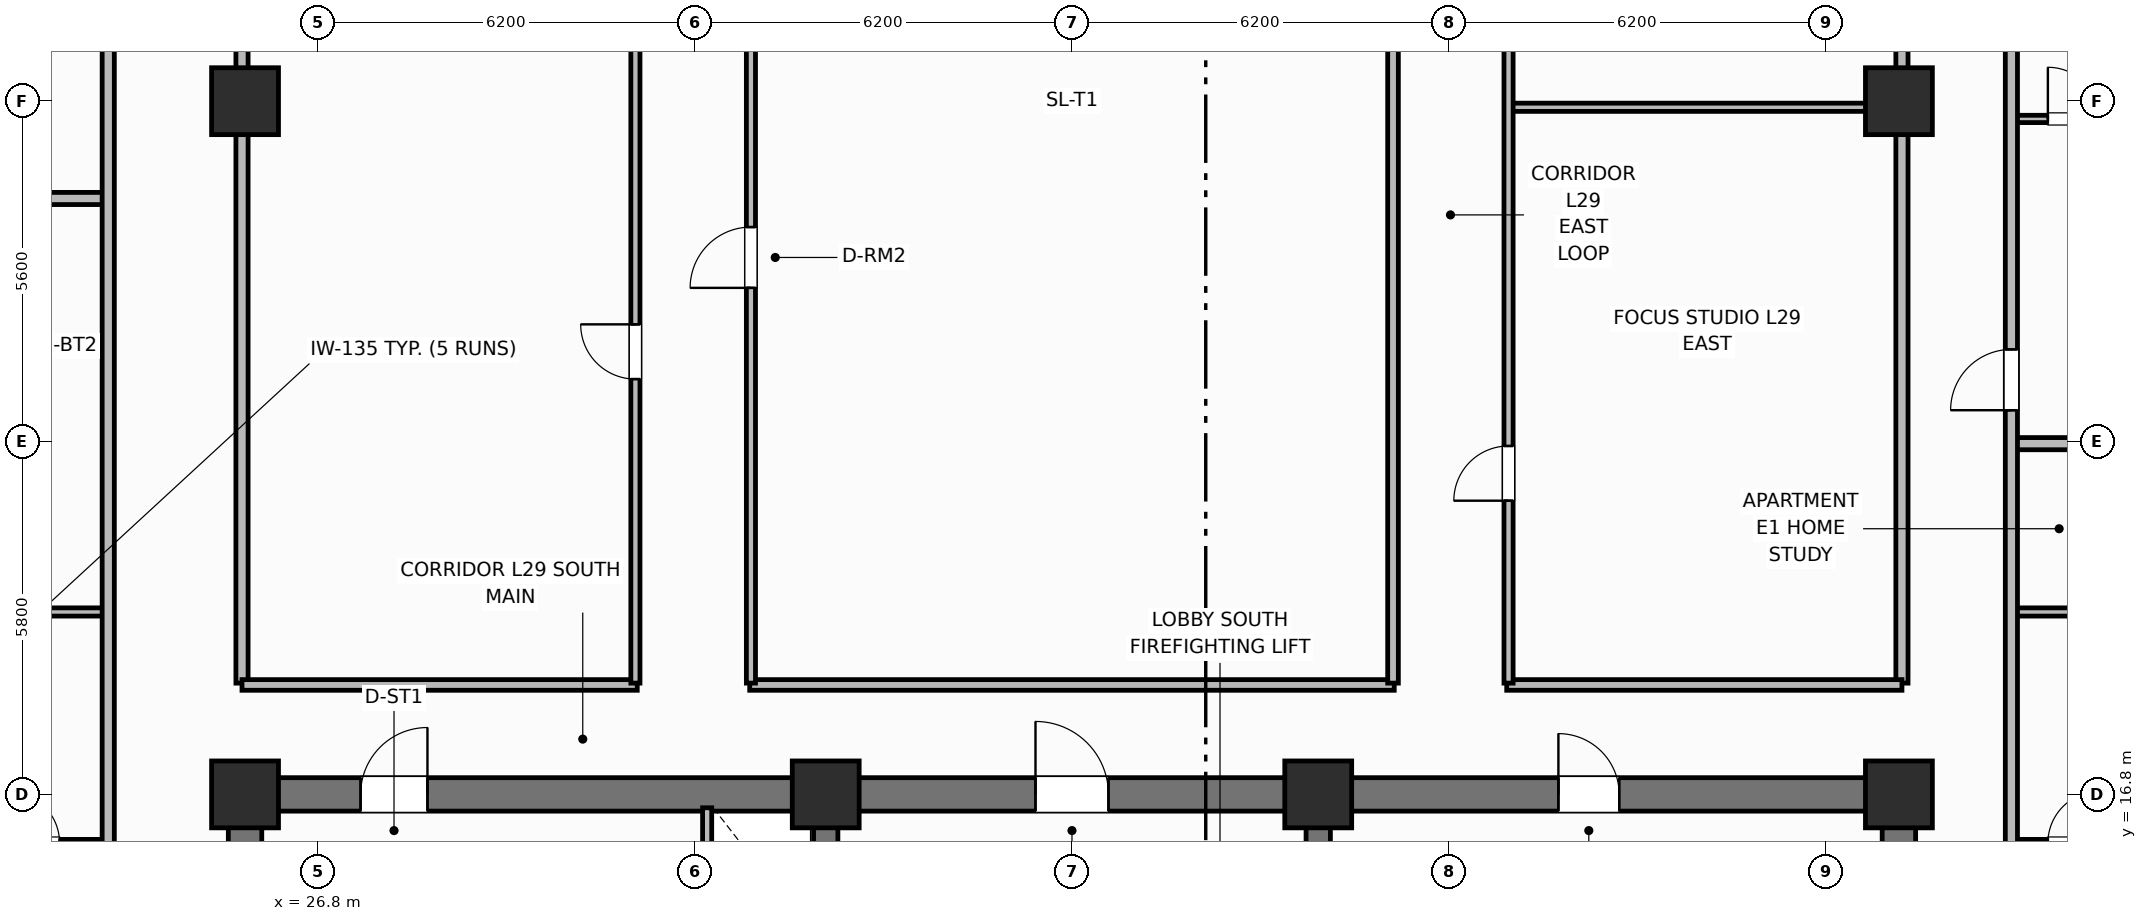
"""IFC4 building model, lengths in metres.
Left out: names, types, materials, properties, quantities, classifications, styles, units other than length and angle.
Written with IfcOpenShell. Run it as: python <this file> out.ifc"""

import sys

from ifc_helpers import new_model, si_unit, direction, frame, frame_2d, origin, origin_2d, place, context, subcontext, project, spatial, rectangle, extrude, element, fill, save


model = new_model("IFC4")
c1 = context("Model", 3, precision=1e-05, world=origin(), true_north=direction((0.0, 1.0)))
c2 = subcontext(c1, "Body", "Model", "MODEL_VIEW")
j1 = project(units=[si_unit("LENGTHUNIT", "METRE"), si_unit("PLANEANGLEUNIT", "RADIAN")], contexts=[c1])
p1 = place(None, origin())
s1 = spatial("IfcSite", under=j1, at=p1, CompositionType="ELEMENT")
p2 = place(p1, origin())
s2 = spatial("IfcBuilding", under=s1, at=p2, CompositionType="ELEMENT")
p3 = place(p2, frame((0.0, 0.0, 117.9)))
s3 = spatial("IfcBuildingStorey", under=s2, at=p3, CompositionType="ELEMENT", Elevation=117.9)
for number, where, z_axis, x_axis in (
    (1, (25.6, 10.875, 0.0), (0.0, 0.0, 1.0), (0.0, 1.0, 0.0)),
    (2, (52.8, 10.875, 0.0), (0.0, 0.0, 1.0), (0.0, 1.0, 0.0)),
):
    element("IfcWall", number, at=place(p3, frame(where, z_axis=z_axis, x_axis=x_axis)), inside=s3, PredefinedType="SHEAR", context=c2, shape_type="SweptSolid", body=[
        extrude(rectangle(XDim=5.65, YDim=0.55, at=frame_2d((2.825, 0.0))), origin(), (0.0, 0.0, 1.0), 3.7),
    ])
p4 = place(p3, frame((25.6, 16.8, 0.0), z_axis=(0.0, 0.0, 1.0), x_axis=(1.0, 0.0, 0.0)))
e3 = element("IfcWall", 3, at=p4, inside=s3, PredefinedType="SHEAR", context=c2, shape_type="SweptSolid", body=[
    extrude(rectangle(XDim=27.2, YDim=0.55, at=frame_2d((13.6, 0.0))), origin(), (0.0, 0.0, 1.0), 3.7),
])
p5 = place(p4, frame((1.9, 0.0, 0.0)))
e4 = element("IfcOpeningElement", 4, at=p5, cuts=e3, PredefinedType="OPENING", context=c2, shape_type="SweptSolid", body=[
    extrude(rectangle(XDim=1.1, YDim=2.15, at=frame_2d((0.55, 1.075))), frame((0.0, 0.285, 0.0), z_axis=(0.0, -1.0, 0.0), x_axis=(1.0, 0.0, 0.0)), (0.0, 0.0, 1.0), 0.57),
])
p6 = place(p4, frame((13.0, 0.0, 0.0)))
e5 = element("IfcOpeningElement", 5, at=p6, cuts=e3, PredefinedType="OPENING", context=c2, shape_type="SweptSolid", body=[
    extrude(rectangle(XDim=1.2, YDim=2.15, at=frame_2d((0.6, 1.075))), frame((0.0, 0.285, 0.0), z_axis=(0.0, -1.0, 0.0), x_axis=(1.0, 0.0, 0.0)), (0.0, 0.0, 1.0), 0.57),
])
p7 = place(p4, frame((21.6, 0.0, 0.0)))
e6 = element("IfcOpeningElement", 6, at=p7, cuts=e3, PredefinedType="OPENING", context=c2, shape_type="SweptSolid", body=[
    extrude(rectangle(XDim=1.0, YDim=2.15, at=frame_2d((0.5, 1.075))), frame((0.0, 0.285, 0.0), z_axis=(0.0, -1.0, 0.0), x_axis=(1.0, 0.0, 0.0)), (0.0, 0.0, 1.0), 0.57),
])
for number, where, z_axis, x_axis in (
    (7, (35.15, 10.875, 0.0), (0.0, 0.0, 1.0), (0.0, 1.0, 0.0)),
    (8, (43.25, 10.875, 0.0), (0.0, 0.0, 1.0), (0.0, 1.0, 0.0)),
):
    element("IfcWall", number, at=place(p3, frame(where, z_axis=z_axis, x_axis=x_axis)), inside=s3, PredefinedType="SHEAR", context=c2, shape_type="SweptSolid", body=[
        extrude(rectangle(XDim=5.65, YDim=0.4, at=frame_2d((2.825, 0.0))), origin(), (0.0, 0.0, 1.0), 3.7),
    ])
for number, where, z_axis, x_axis in (
    (9, (25.6, 16.8, 0.0), (0.0, 0.0, 1.0), (1.0, 0.0, 0.0)),
    (10, (35.15, 16.8, 0.0), (0.0, 0.0, 1.0), (1.0, 0.0, 0.0)),
    (11, (43.25, 16.8, 0.0), (0.0, 0.0, 1.0), (1.0, 0.0, 0.0)),
    (12, (52.8, 16.8, 0.0), (0.0, 0.0, 1.0), (1.0, 0.0, 0.0)),
    (13, (25.6, 28.2, 0.0), (0.0, 0.0, 1.0), (1.0, 0.0, 0.0)),
    (14, (52.8, 28.2, 0.0), (0.0, 0.0, 1.0), (1.0, 0.0, 0.0)),
):
    element("IfcColumn", number, at=place(p3, frame(where, z_axis=z_axis, x_axis=x_axis)), inside=s3, PredefinedType="COLUMN", context=c2, shape_type="SweptSolid", body=[
        extrude(rectangle(XDim=1.1, YDim=1.1, at=origin_2d()), origin(), (0.0, 0.0, 1.0), 3.7),
    ])
p8 = place(p3, frame((33.2, 14.5, 0.0), z_axis=(0.0, 0.0, 1.0), x_axis=(0.0, 1.0, 0.0)))
e15 = element("IfcWall", 15, at=p8, inside=s3, PredefinedType="PARTITIONING", context=c2, shape_type="SweptSolid", body=[
    extrude(rectangle(XDim=2.08, YDim=0.15, at=frame_2d((1.04, 0.0))), origin(), (0.0, 0.0, 1.0), 2.53),
])
p9 = place(p8, frame((0.55, 0.0, 0.0)))
e16 = element("IfcOpeningElement", 16, at=p9, cuts=e15, PredefinedType="OPENING", context=c2, shape_type="SweptSolid", body=[
    extrude(rectangle(XDim=0.85, YDim=2.05, at=frame_2d((0.425, 1.025))), frame((0.0, 0.085, 0.0), z_axis=(0.0, -1.0, 0.0), x_axis=(1.0, 0.0, 0.0)), (0.0, 0.0, 1.0), 0.17),
])
for number, where, z_axis, x_axis in (
    (17, (25.55, 18.63, 0.0), (0.0, 0.0, 1.0), (0.0, 1.0, 0.0)),
    (18, (52.85, 18.63, 0.0), (0.0, 0.0, 1.0), (0.0, 1.0, 0.0)),
):
    element("IfcWall", number, at=place(p3, frame(where, z_axis=z_axis, x_axis=x_axis)), inside=s3, PredefinedType="PARTITIONING", context=c2, shape_type="SweptSolid", body=[
        extrude(rectangle(XDim=19.14, YDim=0.2, at=frame_2d((9.57, 0.0))), origin(), (0.0, 0.0, 1.0), 2.53),
    ])
p10 = place(p3, frame((25.55, 18.6, 0.0), z_axis=(0.0, 0.0, 1.0), x_axis=(1.0, 0.0, 0.0)))
e19 = element("IfcWall", 19, at=p10, inside=s3, PredefinedType="PARTITIONING", context=c2, shape_type="SweptSolid", body=[
    extrude(rectangle(XDim=6.5, YDim=0.175, at=frame_2d((3.25, 0.0))), origin(), (0.0, 0.0, 1.0), 2.53),
])
p11 = place(p3, frame((33.9, 18.6, 0.0), z_axis=(0.0, 0.0, 1.0), x_axis=(1.0, 0.0, 0.0)))
e20 = element("IfcWall", 20, at=p11, inside=s3, PredefinedType="PARTITIONING", context=c2, shape_type="SweptSolid", body=[
    extrude(rectangle(XDim=10.6, YDim=0.175, at=frame_2d((5.3, 0.0))), origin(), (0.0, 0.0, 1.0), 2.53),
])
p12 = place(p3, frame((46.35, 18.6, 0.0), z_axis=(0.0, 0.0, 1.0), x_axis=(1.0, 0.0, 0.0)))
e21 = element("IfcWall", 21, at=p12, inside=s3, PredefinedType="PARTITIONING", context=c2, shape_type="SweptSolid", body=[
    extrude(rectangle(XDim=6.5, YDim=0.175, at=frame_2d((3.25, 0.0))), origin(), (0.0, 0.0, 1.0), 2.53),
])
p13 = place(p3, frame((46.38, 28.1, 0.0), z_axis=(0.0, 0.0, 1.0), x_axis=(1.0, 0.0, 0.0)))
e22 = element("IfcWall", 22, at=p13, inside=s3, PredefinedType="PARTITIONING", context=c2, shape_type="SweptSolid", body=[
    extrude(rectangle(XDim=6.42, YDim=0.135, at=frame_2d((3.21, 0.0))), origin(), (0.0, 0.0, 1.0), 2.53),
])
p14 = place(p3, frame((32.02, 18.63, 0.0), z_axis=(0.0, 0.0, 1.0), x_axis=(0.0, 1.0, 0.0)))
e23 = element("IfcWall", 23, at=p14, inside=s3, PredefinedType="PARTITIONING", context=c2, shape_type="SweptSolid", body=[
    extrude(rectangle(XDim=19.14, YDim=0.15, at=frame_2d((9.57, 0.0))), origin(), (0.0, 0.0, 1.0), 2.53),
])
p15 = place(p14, frame((5.0, 0.0, 0.0)))
e24 = element("IfcOpeningElement", 24, at=p15, cuts=e23, PredefinedType="OPENING", context=c2, shape_type="SweptSolid", body=[
    extrude(rectangle(XDim=0.9, YDim=2.1, at=frame_2d((0.45, 1.05))), frame((0.0, 0.085, 0.0), z_axis=(0.0, -1.0, 0.0), x_axis=(1.0, 0.0, 0.0)), (0.0, 0.0, 1.0), 0.17),
])
p16 = place(p3, frame((33.92, 18.63, 0.0), z_axis=(0.0, 0.0, 1.0), x_axis=(0.0, 1.0, 0.0)))
e25 = element("IfcWall", 25, at=p16, inside=s3, PredefinedType="PARTITIONING", context=c2, shape_type="SweptSolid", body=[
    extrude(rectangle(XDim=19.14, YDim=0.15, at=frame_2d((9.57, 0.0))), origin(), (0.0, 0.0, 1.0), 2.53),
])
p17 = place(p16, frame((6.5, 0.0, 0.0)))
e26 = element("IfcOpeningElement", 26, at=p17, cuts=e25, PredefinedType="OPENING", context=c2, shape_type="SweptSolid", body=[
    extrude(rectangle(XDim=1.0, YDim=2.15, at=frame_2d((0.5, 1.075))), frame((0.0, 0.085, 0.0), z_axis=(0.0, -1.0, 0.0), x_axis=(1.0, 0.0, 0.0)), (0.0, 0.0, 1.0), 0.17),
])
p18 = place(p3, frame((44.48, 18.63, 0.0), z_axis=(0.0, 0.0, 1.0), x_axis=(0.0, 1.0, 0.0)))
e27 = element("IfcWall", 27, at=p18, inside=s3, PredefinedType="PARTITIONING", context=c2, shape_type="SweptSolid", body=[
    extrude(rectangle(XDim=19.14, YDim=0.175, at=frame_2d((9.57, 0.0))), origin(), (0.0, 0.0, 1.0), 2.53),
])
p19 = place(p3, frame((46.38, 18.63, 0.0), z_axis=(0.0, 0.0, 1.0), x_axis=(0.0, 1.0, 0.0)))
e28 = element("IfcWall", 28, at=p19, inside=s3, PredefinedType="PARTITIONING", context=c2, shape_type="SweptSolid", body=[
    extrude(rectangle(XDim=19.14, YDim=0.15, at=frame_2d((9.57, 0.0))), origin(), (0.0, 0.0, 1.0), 2.53),
])
p20 = place(p19, frame((3.0, 0.0, 0.0)))
e29 = element("IfcOpeningElement", 29, at=p20, cuts=e28, PredefinedType="OPENING", context=c2, shape_type="SweptSolid", body=[
    extrude(rectangle(XDim=0.9, YDim=2.1, at=frame_2d((0.45, 1.05))), frame((0.0, 0.085, 0.0), z_axis=(0.0, -1.0, 0.0), x_axis=(1.0, 0.0, 0.0)), (0.0, 0.0, 1.0), 0.17),
])
p21 = place(p19, frame((11.5, 0.0, 0.0)))
e30 = element("IfcOpeningElement", 30, at=p21, cuts=e28, PredefinedType="OPENING", context=c2, shape_type="SweptSolid", body=[
    extrude(rectangle(XDim=0.9, YDim=2.1, at=frame_2d((0.45, 1.05))), frame((0.0, 0.085, 0.0), z_axis=(0.0, -1.0, 0.0), x_axis=(1.0, 0.0, 0.0)), (0.0, 0.0, 1.0), 0.17),
])
p22 = place(p3, frame((21.1, 16.0, 0.0), z_axis=(0.0, 0.0, 1.0), x_axis=(1.0, 0.0, 0.0)))
e31 = element("IfcWall", 31, at=p22, inside=s3, PredefinedType="PARTITIONING", context=c2, shape_type="SweptSolid", body=[
    extrude(rectangle(XDim=2.25, YDim=0.12, at=frame_2d((1.125, 0.0))), origin(), (0.0, 0.0, 1.0), 2.53),
])
p23 = place(p22, frame((0.6, 0.0, 0.0)))
e32 = element("IfcOpeningElement", 32, at=p23, cuts=e31, PredefinedType="OPENING", context=c2, shape_type="SweptSolid", body=[
    extrude(rectangle(XDim=0.85, YDim=2.1, at=frame_2d((0.425, 1.05))), frame((0.0, 0.07, 0.0), z_axis=(0.0, -1.0, 0.0), x_axis=(1.0, 0.0, 0.0)), (0.0, 0.0, 1.0), 0.14),
])
p24 = place(p3, frame((21.1, 19.8, 0.0), z_axis=(0.0, 0.0, 1.0), x_axis=(1.0, 0.0, 0.0)))
e33 = element("IfcWall", 33, at=p24, inside=s3, PredefinedType="PARTITIONING", context=c2, shape_type="SweptSolid", body=[
    extrude(rectangle(XDim=2.25, YDim=0.135, at=frame_2d((1.125, 0.0))), origin(), (0.0, 0.0, 1.0), 2.53),
])
p25 = place(p3, frame((14.999, 26.6, 0.0), z_axis=(0.0, 0.0, 1.0), x_axis=(1.0, 0.0, 0.0)))
e34 = element("IfcWall", 34, at=p25, inside=s3, PredefinedType="PARTITIONING", context=c2, shape_type="SweptSolid", body=[
    extrude(rectangle(XDim=8.352, YDim=0.2, at=frame_2d((4.176, 0.0))), origin(), (0.0, 0.0, 1.0), 2.53),
])
p26 = place(p3, frame((23.35, 10.6, 0.0), z_axis=(0.0, 0.0, 1.0), x_axis=(0.0, 1.0, 0.0)))
e35 = element("IfcWall", 35, at=p26, inside=s3, PredefinedType="PARTITIONING", context=c2, shape_type="SweptSolid", body=[
    extrude(rectangle(XDim=35.2, YDim=0.2, at=frame_2d((17.6, 0.0))), origin(), (0.0, 0.0, 1.0), 2.53),
])
p27 = place(p26, frame((2.65, 0.0, 0.0)))
e36 = element("IfcOpeningElement", 36, at=p27, cuts=e35, PredefinedType="OPENING", context=c2, shape_type="SweptSolid", body=[
    extrude(rectangle(XDim=1.0, YDim=2.15, at=frame_2d((0.5, 1.075))), frame((0.0, 0.11, 0.0), z_axis=(0.0, -1.0, 0.0), x_axis=(1.0, 0.0, 0.0)), (0.0, 0.0, 1.0), 0.22),
])
p28 = place(p26, frame((19.95, 0.0, 0.0)))
e37 = element("IfcOpeningElement", 37, at=p28, cuts=e35, PredefinedType="OPENING", context=c2, shape_type="SweptSolid", body=[
    extrude(rectangle(XDim=1.0, YDim=2.15, at=frame_2d((0.5, 1.075))), frame((0.0, 0.11, 0.0), z_axis=(0.0, -1.0, 0.0), x_axis=(1.0, 0.0, 0.0)), (0.0, 0.0, 1.0), 0.22),
])
p29 = place(p3, frame((54.65, 16.0, 0.0), z_axis=(0.0, 0.0, 1.0), x_axis=(1.0, 0.0, 0.0)))
e38 = element("IfcWall", 38, at=p29, inside=s3, PredefinedType="PARTITIONING", context=c2, shape_type="SweptSolid", body=[
    extrude(rectangle(XDim=2.25, YDim=0.12, at=frame_2d((1.125, 0.0))), origin(), (0.0, 0.0, 1.0), 2.53),
])
p30 = place(p29, frame((0.6, 0.0, 0.0)))
e39 = element("IfcOpeningElement", 39, at=p30, cuts=e38, PredefinedType="OPENING", context=c2, shape_type="SweptSolid", body=[
    extrude(rectangle(XDim=0.85, YDim=2.1, at=frame_2d((0.425, 1.05))), frame((0.0, 0.07, 0.0), z_axis=(0.0, -1.0, 0.0), x_axis=(1.0, 0.0, 0.0)), (0.0, 0.0, 1.0), 0.14),
])
p31 = place(p3, frame((54.65, 19.8, 0.0), z_axis=(0.0, 0.0, 1.0), x_axis=(1.0, 0.0, 0.0)))
e40 = element("IfcWall", 40, at=p31, inside=s3, PredefinedType="PARTITIONING", context=c2, shape_type="SweptSolid", body=[
    extrude(rectangle(XDim=2.25, YDim=0.135, at=frame_2d((1.125, 0.0))), origin(), (0.0, 0.0, 1.0), 2.53),
])
p32 = place(p3, frame((54.65, 22.568, 0.0), z_axis=(0.0, 0.0, 1.0), x_axis=(1.0, 0.0, 0.0)))
e41 = element("IfcWall", 41, at=p32, inside=s3, PredefinedType="PARTITIONING", context=c2, shape_type="SweptSolid", body=[
    extrude(rectangle(XDim=9.18, YDim=0.2, at=frame_2d((4.59, 0.0))), origin(), (0.0, 0.0, 1.0), 2.53),
])
p33 = place(p3, frame((54.65, 27.908, 0.0), z_axis=(0.0, 0.0, 1.0), x_axis=(1.0, 0.0, 0.0)))
e42 = element("IfcWall", 42, at=p33, inside=s3, PredefinedType="PARTITIONING", context=c2, shape_type="SweptSolid", body=[
    extrude(rectangle(XDim=2.25, YDim=0.12, at=frame_2d((1.125, 0.0))), origin(), (0.0, 0.0, 1.0), 2.53),
])
p34 = place(p33, frame((0.6, 0.0, 0.0)))
e43 = element("IfcOpeningElement", 43, at=p34, cuts=e42, PredefinedType="OPENING", context=c2, shape_type="SweptSolid", body=[
    extrude(rectangle(XDim=0.85, YDim=2.1, at=frame_2d((0.425, 1.05))), frame((0.0, 0.07, 0.0), z_axis=(0.0, -1.0, 0.0), x_axis=(1.0, 0.0, 0.0)), (0.0, 0.0, 1.0), 0.14),
])
p35 = place(p3, frame((54.65, 10.6, 0.0), z_axis=(0.0, 0.0, 1.0), x_axis=(0.0, 1.0, 0.0)))
e44 = element("IfcWall", 44, at=p35, inside=s3, PredefinedType="PARTITIONING", context=c2, shape_type="SweptSolid", body=[
    extrude(rectangle(XDim=35.2, YDim=0.2, at=frame_2d((17.6, 0.0))), origin(), (0.0, 0.0, 1.0), 2.53),
])
p36 = place(p35, frame((2.65, 0.0, 0.0)))
e45 = element("IfcOpeningElement", 45, at=p36, cuts=e44, PredefinedType="OPENING", context=c2, shape_type="SweptSolid", body=[
    extrude(rectangle(XDim=1.0, YDim=2.15, at=frame_2d((0.5, 1.075))), frame((0.0, 0.11, 0.0), z_axis=(0.0, -1.0, 0.0), x_axis=(1.0, 0.0, 0.0)), (0.0, 0.0, 1.0), 0.22),
])
p37 = place(p35, frame((12.518, 0.0, 0.0)))
e46 = element("IfcOpeningElement", 46, at=p37, cuts=e44, PredefinedType="OPENING", context=c2, shape_type="SweptSolid", body=[
    extrude(rectangle(XDim=1.0, YDim=2.15, at=frame_2d((0.5, 1.075))), frame((0.0, 0.11, 0.0), z_axis=(0.0, -1.0, 0.0), x_axis=(1.0, 0.0, 0.0)), (0.0, 0.0, 1.0), 0.22),
])
p38 = place(p35, frame((23.65, 0.0, 0.0)))
e47 = element("IfcOpeningElement", 47, at=p38, cuts=e44, PredefinedType="OPENING", context=c2, shape_type="SweptSolid", body=[
    extrude(rectangle(XDim=1.0, YDim=2.15, at=frame_2d((0.5, 1.075))), frame((0.0, 0.11, 0.0), z_axis=(0.0, -1.0, 0.0), x_axis=(1.0, 0.0, 0.0)), (0.0, 0.0, 1.0), 0.22),
])
p39 = place(p15, origin())
e48 = element("IfcDoor", 48, at=p39, inside=s3, OperationType="SINGLE_SWING_RIGHT", PredefinedType="DOOR", context=c2, shape_type="SweptSolid", body=[
    extrude(rectangle(XDim=0.9, YDim=2.1, at=frame_2d((0.45, 1.05))), frame((0.0, 0.025, 0.0), z_axis=(0.0, -1.0, 0.0), x_axis=(1.0, 0.0, 0.0)), (0.0, 0.0, 1.0), 0.05),
])
fill(e24, e48)
p40 = place(p17, origin())
e49 = element("IfcDoor", 49, at=p40, inside=s3, OperationType="SINGLE_SWING_LEFT", PredefinedType="DOOR", context=c2, shape_type="SweptSolid", body=[
    extrude(rectangle(XDim=1.0, YDim=2.15, at=frame_2d((0.5, 1.075))), frame((0.0, 0.025, 0.0), z_axis=(0.0, -1.0, 0.0), x_axis=(1.0, 0.0, 0.0)), (0.0, 0.0, 1.0), 0.05),
])
fill(e26, e49)
p41 = place(p20, origin())
e50 = element("IfcDoor", 50, at=p41, inside=s3, OperationType="SINGLE_SWING_LEFT", PredefinedType="DOOR", context=c2, shape_type="SweptSolid", body=[
    extrude(rectangle(XDim=0.9, YDim=2.1, at=frame_2d((0.45, 1.05))), frame((0.0, 0.025, 0.0), z_axis=(0.0, -1.0, 0.0), x_axis=(1.0, 0.0, 0.0)), (0.0, 0.0, 1.0), 0.05),
])
fill(e29, e50)
p42 = place(p23, origin())
e51 = element("IfcDoor", 51, at=p42, inside=s3, OperationType="SINGLE_SWING_LEFT", PredefinedType="DOOR", context=c2, shape_type="SweptSolid", body=[
    extrude(rectangle(XDim=0.85, YDim=2.1, at=frame_2d((0.425, 1.05))), frame((0.0, 0.025, 0.0), z_axis=(0.0, -1.0, 0.0), x_axis=(1.0, 0.0, 0.0)), (0.0, 0.0, 1.0), 0.05),
])
fill(e32, e51)
p43 = place(p30, origin())
e52 = element("IfcDoor", 52, at=p43, inside=s3, OperationType="SINGLE_SWING_RIGHT", PredefinedType="DOOR", context=c2, shape_type="SweptSolid", body=[
    extrude(rectangle(XDim=0.85, YDim=2.1, at=frame_2d((0.425, 1.05))), frame((0.0, 0.025, 0.0), z_axis=(0.0, -1.0, 0.0), x_axis=(1.0, 0.0, 0.0)), (0.0, 0.0, 1.0), 0.05),
])
fill(e39, e52)
p44 = place(p34, origin())
e53 = element("IfcDoor", 53, at=p44, inside=s3, OperationType="SINGLE_SWING_LEFT", PredefinedType="DOOR", context=c2, shape_type="SweptSolid", body=[
    extrude(rectangle(XDim=0.85, YDim=2.1, at=frame_2d((0.425, 1.05))), frame((0.0, 0.025, 0.0), z_axis=(0.0, -1.0, 0.0), x_axis=(1.0, 0.0, 0.0)), (0.0, 0.0, 1.0), 0.05),
])
fill(e43, e53)
p45 = place(p37, origin())
e54 = element("IfcDoor", 54, at=p45, inside=s3, OperationType="SINGLE_SWING_LEFT", PredefinedType="DOOR", context=c2, shape_type="SweptSolid", body=[
    extrude(rectangle(XDim=1.0, YDim=2.15, at=frame_2d((0.5, 1.075))), frame((0.0, 0.025, 0.0), z_axis=(0.0, -1.0, 0.0), x_axis=(1.0, 0.0, 0.0)), (0.0, 0.0, 1.0), 0.05),
])
fill(e46, e54)
p46 = place(p5, origin())
e55 = element("IfcDoor", 55, at=p46, inside=s3, OperationType="SINGLE_SWING_RIGHT", PredefinedType="DOOR", context=c2, shape_type="SweptSolid", body=[
    extrude(rectangle(XDim=1.1, YDim=2.15, at=frame_2d((0.55, 1.075))), frame((0.0, 0.025, 0.0), z_axis=(0.0, -1.0, 0.0), x_axis=(1.0, 0.0, 0.0)), (0.0, 0.0, 1.0), 0.05),
])
fill(e4, e55)
p47 = place(p6, origin())
e56 = element("IfcDoor", 56, at=p47, inside=s3, OperationType="SINGLE_SWING_LEFT", PredefinedType="DOOR", context=c2, shape_type="SweptSolid", body=[
    extrude(rectangle(XDim=1.2, YDim=2.15, at=frame_2d((0.6, 1.075))), frame((0.0, 0.025, 0.0), z_axis=(0.0, -1.0, 0.0), x_axis=(1.0, 0.0, 0.0)), (0.0, 0.0, 1.0), 0.05),
])
fill(e5, e56)
p48 = place(p7, origin())
e57 = element("IfcDoor", 57, at=p48, inside=s3, OperationType="SINGLE_SWING_LEFT", PredefinedType="DOOR", context=c2, shape_type="SweptSolid", body=[
    extrude(rectangle(XDim=1.0, YDim=2.15, at=frame_2d((0.5, 1.075))), frame((0.0, 0.025, 0.0), z_axis=(0.0, -1.0, 0.0), x_axis=(1.0, 0.0, 0.0)), (0.0, 0.0, 1.0), 0.05),
])
fill(e6, e57)
save(model, sys.argv[1])
